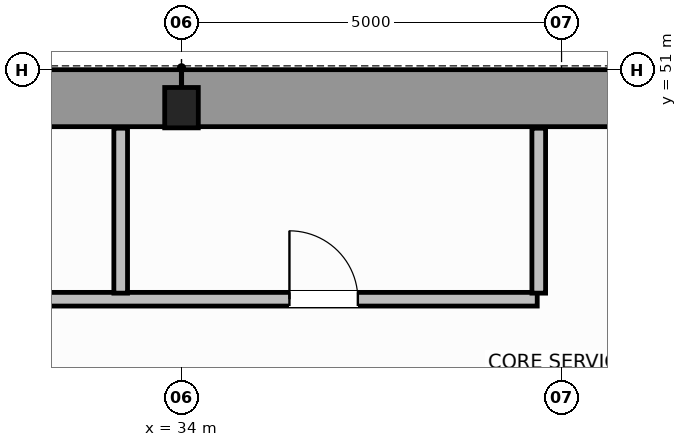
"""IFC4 building model, lengths in metres.
Left out: names, types, materials, properties, quantities, classifications, styles, units other than length and angle.
Written with IfcOpenShell. Run it as: python <this file> out.ifc"""

import sys

from ifc_helpers import new_model, si_unit, direction, frame, frame_2d, origin, origin_2d, place, context, subcontext, project, spatial, rectangle, i_section, extrude, source, transform, mapped, element, fill, save


model = new_model("IFC4")
c1 = context("Model", 3, precision=1e-05, world=origin(), true_north=direction((0.0, 1.0)))
c2 = subcontext(c1, "Body", "Model", "MODEL_VIEW")
j1 = project(units=[si_unit("LENGTHUNIT", "METRE"), si_unit("PLANEANGLEUNIT", "RADIAN")], contexts=[c1])
p1 = place(None, origin())
s1 = spatial("IfcSite", under=j1, at=p1, CompositionType="ELEMENT")
p2 = place(p1, origin())
s2 = spatial("IfcBuilding", under=s1, at=p2, CompositionType="ELEMENT")
p3 = place(p2, frame((0.0, 0.0, 118.6)))
s3 = spatial("IfcBuildingStorey", under=s2, at=p3, CompositionType="ELEMENT", Elevation=118.6)
m1 = source(origin(), c2, "Body", "SweptSolid", [
    extrude(i_section(OverallWidth=0.442, OverallDepth=0.531, WebThickness=0.065, FlangeThickness=0.076, FilletRadius=0.015, at=origin_2d()), origin(), (0.0, 0.0, 1.0), 3.8),
])
p4 = place(p3, frame((34.0, 50.5, 0.0), z_axis=(0.0, 0.0, 1.0), x_axis=(1.0, 0.0, 0.0)))
e1 = element("IfcColumn", 1, at=p4, inside=s3, PredefinedType="COLUMN", context=c2, shape_type="MappedRepresentation", body=[
    mapped(m1, transform((0.0, 0.0, 0.0), scale=1.0)),
])
for number, where, z_axis, x_axis in (
    (2, (14.379, 50.625, 0.0), (0.0, 0.0, 1.0), (1.0, 0.0, 0.0)),
    (3, (34.002, 50.625, 0.0), (0.0, 0.0, 1.0), (1.0, 0.0, 0.0)),
):
    element("IfcWall", number, at=place(p3, frame(where, z_axis=z_axis, x_axis=x_axis)), inside=s3, PredefinedType="SHEAR", context=c2, shape_type="SweptSolid", body=[
        extrude(rectangle(XDim=19.619, YDim=0.75, at=frame_2d((9.81, 0.0))), origin(), (0.0, 0.0, 1.0), 3.8),
    ])
p5 = place(p3, frame((18.62, 47.98, 0.0), z_axis=(0.0, 0.0, 1.0), x_axis=(1.0, 0.0, 0.0)))
e4 = element("IfcWall", 4, at=p5, inside=s3, PredefinedType="PLUMBINGWALL", context=c2, shape_type="SweptSolid", body=[
    extrude(rectangle(XDim=20.06, YDim=0.18, at=frame_2d((10.03, 0.0))), origin(), (0.0, 0.0, 1.0), 3.58),
])
p6 = place(p5, frame((3.5, 0.0, 0.0)))
e5 = element("IfcOpeningElement", 5, at=p6, cuts=e4, PredefinedType="OPENING", context=c2, shape_type="SweptSolid", body=[
    extrude(rectangle(XDim=0.9, YDim=2.15, at=frame_2d((0.45, 1.075))), frame((0.0, 0.1, 0.0), z_axis=(0.0, -1.0, 0.0), x_axis=(1.0, 0.0, 0.0)), (0.0, 0.0, 1.0), 0.2),
])
p7 = place(p5, frame((10.8, 0.0, 0.0)))
e6 = element("IfcOpeningElement", 6, at=p7, cuts=e4, PredefinedType="OPENING", context=c2, shape_type="SweptSolid", body=[
    extrude(rectangle(XDim=0.9, YDim=2.15, at=frame_2d((0.45, 1.075))), frame((0.0, 0.1, 0.0), z_axis=(0.0, -1.0, 0.0), x_axis=(1.0, 0.0, 0.0)), (0.0, 0.0, 1.0), 0.2),
])
p8 = place(p5, frame((16.8, 0.0, 0.0)))
e7 = element("IfcOpeningElement", 7, at=p8, cuts=e4, PredefinedType="OPENING", context=c2, shape_type="SweptSolid", body=[
    extrude(rectangle(XDim=0.9, YDim=2.15, at=frame_2d((0.45, 1.075))), frame((0.0, 0.1, 0.0), z_axis=(0.0, -1.0, 0.0), x_axis=(1.0, 0.0, 0.0)), (0.0, 0.0, 1.0), 0.2),
])
for number, where, z_axis, x_axis in (
    (8, (33.2, 48.06, 0.0), (0.0, 0.0, 1.0), (0.0, 1.0, 0.0)),
    (9, (38.7, 48.06, 0.0), (0.0, 0.0, 1.0), (0.0, 1.0, 0.0)),
):
    element("IfcWall", number, at=place(p3, frame(where, z_axis=z_axis, x_axis=x_axis)), inside=s3, PredefinedType="PLUMBINGWALL", context=c2, shape_type="SweptSolid", body=[
        extrude(rectangle(XDim=2.17, YDim=0.18, at=frame_2d((1.085, 0.0))), origin(), (0.0, 0.0, 1.0), 3.58),
    ])
m2 = source(origin(), c2, "Body", "SweptSolid", [
    extrude(rectangle(XDim=0.9, YDim=2.15, at=frame_2d((0.45, 1.075))), frame((0.0, 0.025, 0.0), z_axis=(0.0, -1.0, 0.0), x_axis=(1.0, 0.0, 0.0)), (0.0, 0.0, 1.0), 0.05),
])
p9 = place(p8, origin())
e10 = element("IfcDoor", 10, at=p9, inside=s3, OperationType="SINGLE_SWING_LEFT", PredefinedType="DOOR", context=c2, shape_type="MappedRepresentation", body=[
    mapped(m2, transform((0.0, 0.0, 0.0), scale=1.0)),
])
fill(e7, e10)
save(model, sys.argv[1])
